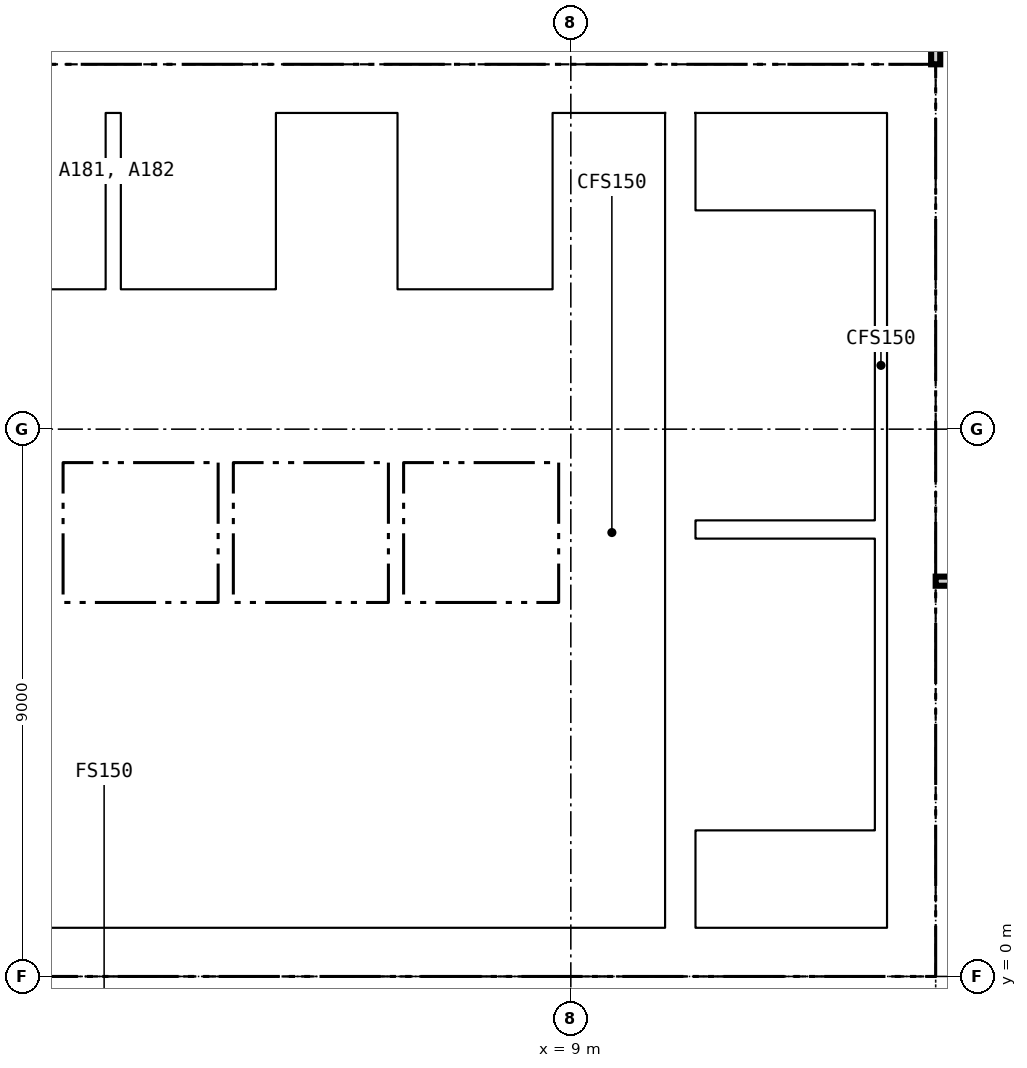
"""IFC4 building model, lengths in metres.
Left out: names, types, materials, properties, quantities, classifications, styles, units other than length and angle.
Written with IfcOpenShell. Run it as: python <this file> out.ifc"""

import sys

from ifc_helpers import new_model, si_unit, direction, frame, frame_2d, origin, place, context, subcontext, project, spatial, rectangle, extrude, element, fill, save


model = new_model("IFC4")
c1 = context("Model", 3, precision=1e-05, world=origin(), true_north=direction((0.0, 1.0)))
c2 = subcontext(c1, "Body", "Model", "MODEL_VIEW")
j1 = project(units=[si_unit("LENGTHUNIT", "METRE"), si_unit("PLANEANGLEUNIT", "RADIAN")], contexts=[c1])
p1 = place(None, origin())
s1 = spatial("IfcSite", under=j1, at=p1, CompositionType="ELEMENT")
p2 = place(p1, origin())
s2 = spatial("IfcBuilding", under=s1, at=p2, CompositionType="ELEMENT")
p3 = place(p2, frame((0.0, 0.0, 148.05)))
s3 = spatial("IfcBuildingStorey", under=s2, at=p3, CompositionType="ELEMENT", Elevation=148.05)
p4 = place(p3, frame((-15.0, 0.4, -0.15), z_axis=(0.0, 0.0, 1.0), x_axis=(1.0, 0.0, 0.0)))
e1 = element("IfcWall", 1, at=p4, inside=s3, PredefinedType="SOLIDWALL", context=c2, shape_type="SweptSolid", body=[
    extrude(rectangle(XDim=30.0, YDim=0.8, at=frame_2d((15.0, 0.0))), origin(), (0.0, 0.0, 1.0), 3.65),
])
p5 = place(p4, frame((5.8, 0.0, 0.15)))
e2 = element("IfcOpeningElement", 2, at=p5, cuts=e1, PredefinedType="OPENING", context=c2, shape_type="SweptSolid", body=[
    extrude(rectangle(XDim=2.4, YDim=2.4, at=frame_2d((1.2, 1.2))), frame((0.0, 0.41, 0.0), z_axis=(0.0, -1.0, 0.0), x_axis=(1.0, 0.0, 0.0)), (0.0, 0.0, 1.0), 0.82),
])
p6 = place(p4, frame((13.8, 0.0, 0.15)))
e3 = element("IfcOpeningElement", 3, at=p6, cuts=e1, PredefinedType="OPENING", context=c2, shape_type="SweptSolid", body=[
    extrude(rectangle(XDim=2.4, YDim=2.4, at=frame_2d((1.2, 1.2))), frame((0.0, 0.41, 0.0), z_axis=(0.0, -1.0, 0.0), x_axis=(1.0, 0.0, 0.0)), (0.0, 0.0, 1.0), 0.82),
])
p7 = place(p4, frame((21.8, 0.0, 0.15)))
e4 = element("IfcOpeningElement", 4, at=p7, cuts=e1, PredefinedType="OPENING", context=c2, shape_type="SweptSolid", body=[
    extrude(rectangle(XDim=2.4, YDim=2.4, at=frame_2d((1.2, 1.2))), frame((0.0, 0.41, 0.0), z_axis=(0.0, -1.0, 0.0), x_axis=(1.0, 0.0, 0.0)), (0.0, 0.0, 1.0), 0.82),
])
p8 = place(p4, frame((1.5, 0.0, 0.15)))
e5 = element("IfcOpeningElement", 5, at=p8, cuts=e1, PredefinedType="OPENING", context=c2, shape_type="SweptSolid", body=[
    extrude(rectangle(XDim=1.2, YDim=2.1, at=frame_2d((0.6, 1.05))), frame((0.0, 0.41, 0.0), z_axis=(0.0, -1.0, 0.0), x_axis=(1.0, 0.0, 0.0)), (0.0, 0.0, 1.0), 0.82),
])
p9 = place(p4, frame((27.3, 0.0, 0.15)))
e6 = element("IfcOpeningElement", 6, at=p9, cuts=e1, PredefinedType="OPENING", context=c2, shape_type="SweptSolid", body=[
    extrude(rectangle(XDim=1.2, YDim=2.1, at=frame_2d((0.6, 1.05))), frame((0.0, 0.41, 0.0), z_axis=(0.0, -1.0, 0.0), x_axis=(1.0, 0.0, 0.0)), (0.0, 0.0, 1.0), 0.82),
])
p10 = place(p3, frame((-15.0, 14.6, -0.15), z_axis=(0.0, 0.0, 1.0), x_axis=(1.0, 0.0, 0.0)))
e7 = element("IfcWall", 7, at=p10, inside=s3, PredefinedType="SOLIDWALL", context=c2, shape_type="SweptSolid", body=[
    extrude(rectangle(XDim=30.0, YDim=0.8, at=frame_2d((15.0, 0.0))), origin(), (0.0, 0.0, 1.0), 3.65),
])
p11 = place(p10, frame((9.25, 0.0, 0.15)))
e8 = element("IfcOpeningElement", 8, at=p11, cuts=e7, PredefinedType="OPENING", context=c2, shape_type="SweptSolid", body=[
    extrude(rectangle(XDim=1.5, YDim=2.1, at=frame_2d((0.75, 1.05))), frame((0.0, 0.41, 0.0), z_axis=(0.0, -1.0, 0.0), x_axis=(1.0, 0.0, 0.0)), (0.0, 0.0, 1.0), 0.82),
])
p12 = place(p10, frame((19.4, 0.0, 0.15)))
e9 = element("IfcOpeningElement", 9, at=p12, cuts=e7, PredefinedType="OPENING", context=c2, shape_type="SweptSolid", body=[
    extrude(rectangle(XDim=1.5, YDim=2.1, at=frame_2d((0.75, 1.05))), frame((0.0, 0.41, 0.0), z_axis=(0.0, -1.0, 0.0), x_axis=(1.0, 0.0, 0.0)), (0.0, 0.0, 1.0), 0.82),
])
p13 = place(p10, frame((1.5, 0.0, 0.15)))
e10 = element("IfcOpeningElement", 10, at=p13, cuts=e7, PredefinedType="OPENING", context=c2, shape_type="SweptSolid", body=[
    extrude(rectangle(XDim=1.2, YDim=2.1, at=frame_2d((0.6, 1.05))), frame((0.0, 0.41, 0.0), z_axis=(0.0, -1.0, 0.0), x_axis=(1.0, 0.0, 0.0)), (0.0, 0.0, 1.0), 0.82),
])
p14 = place(p10, frame((27.3, 0.0, 0.15)))
e11 = element("IfcOpeningElement", 11, at=p14, cuts=e7, PredefinedType="OPENING", context=c2, shape_type="SweptSolid", body=[
    extrude(rectangle(XDim=1.2, YDim=2.1, at=frame_2d((0.6, 1.05))), frame((0.0, 0.41, 0.0), z_axis=(0.0, -1.0, 0.0), x_axis=(1.0, 0.0, 0.0)), (0.0, 0.0, 1.0), 0.82),
])
p15 = place(p3, frame((14.6, 0.8, -0.15), z_axis=(0.0, 0.0, 1.0), x_axis=(0.0, 1.0, 0.0)))
e12 = element("IfcWall", 12, at=p15, inside=s3, PredefinedType="SOLIDWALL", context=c2, shape_type="SweptSolid", body=[
    extrude(rectangle(XDim=13.4, YDim=0.8, at=frame_2d((6.7, 0.0))), origin(), (0.0, 0.0, 1.0), 3.65),
])
p16 = place(p3, frame((10.8, 0.8, -0.15), z_axis=(0.0, 0.0, 1.0), x_axis=(0.0, 1.0, 0.0)))
e13 = element("IfcWall", 13, at=p16, inside=s3, PredefinedType="SOLIDWALL", context=c2, shape_type="SweptSolid", body=[
    extrude(rectangle(XDim=13.4, YDim=0.5, at=frame_2d((6.7, 0.0))), origin(), (0.0, 0.0, 1.0), 3.65),
])
p17 = place(p3, frame((-10.55, 3.5, 0.0), z_axis=(0.0, 0.0, 1.0), x_axis=(1.0, 0.0, 0.0)))
e14 = element("IfcWall", 14, at=p17, inside=s3, PredefinedType="PARTITIONING", context=c2, shape_type="SweptSolid", body=[
    extrude(rectangle(XDim=21.1, YDim=0.2, at=frame_2d((10.55, 0.0))), origin(), (0.0, 0.0, 1.0), 3.5),
])
p18 = place(p17, frame((2.312, 0.0, 0.0)))
e15 = element("IfcOpeningElement", 15, at=p18, cuts=e14, PredefinedType="OPENING", context=c2, shape_type="SweptSolid", body=[
    extrude(rectangle(XDim=1.0, YDim=2.1, at=frame_2d((0.5, 1.05))), frame((0.0, 0.11, 0.0), z_axis=(0.0, -1.0, 0.0), x_axis=(1.0, 0.0, 0.0)), (0.0, 0.0, 1.0), 0.22),
])
p19 = place(p17, frame((7.05, 0.0, 0.0)))
e16 = element("IfcOpeningElement", 16, at=p19, cuts=e14, PredefinedType="OPENING", context=c2, shape_type="SweptSolid", body=[
    extrude(rectangle(XDim=1.0, YDim=2.1, at=frame_2d((0.5, 1.05))), frame((0.0, 0.11, 0.0), z_axis=(0.0, -1.0, 0.0), x_axis=(1.0, 0.0, 0.0)), (0.0, 0.0, 1.0), 0.22),
])
p20 = place(p17, frame((10.175, 0.0, 0.0)))
e17 = element("IfcOpeningElement", 17, at=p20, cuts=e14, PredefinedType="OPENING", context=c2, shape_type="SweptSolid", body=[
    extrude(rectangle(XDim=1.0, YDim=2.1, at=frame_2d((0.5, 1.05))), frame((0.0, 0.11, 0.0), z_axis=(0.0, -1.0, 0.0), x_axis=(1.0, 0.0, 0.0)), (0.0, 0.0, 1.0), 0.22),
])
p21 = place(p17, frame((14.05, 0.0, 0.0)))
e18 = element("IfcOpeningElement", 18, at=p21, cuts=e14, PredefinedType="OPENING", context=c2, shape_type="SweptSolid", body=[
    extrude(rectangle(XDim=1.0, YDim=2.1, at=frame_2d((0.5, 1.05))), frame((0.0, 0.11, 0.0), z_axis=(0.0, -1.0, 0.0), x_axis=(1.0, 0.0, 0.0)), (0.0, 0.0, 1.0), 0.22),
])
p22 = place(p17, frame((17.837, 0.0, 0.0)))
e19 = element("IfcOpeningElement", 19, at=p22, cuts=e14, PredefinedType="OPENING", context=c2, shape_type="SweptSolid", body=[
    extrude(rectangle(XDim=0.9, YDim=2.1, at=frame_2d((0.45, 1.05))), frame((0.0, 0.11, 0.0), z_axis=(0.0, -1.0, 0.0), x_axis=(1.0, 0.0, 0.0)), (0.0, 0.0, 1.0), 0.22),
])
p23 = place(p17, frame((19.9, 0.0, 0.0)))
e20 = element("IfcOpeningElement", 20, at=p23, cuts=e14, PredefinedType="OPENING", context=c2, shape_type="SweptSolid", body=[
    extrude(rectangle(XDim=0.9, YDim=2.1, at=frame_2d((0.45, 1.05))), frame((0.0, 0.11, 0.0), z_axis=(0.0, -1.0, 0.0), x_axis=(1.0, 0.0, 0.0)), (0.0, 0.0, 1.0), 0.22),
])
p24 = place(p3, frame((-10.55, 6.025, 0.0), z_axis=(0.0, 0.0, 1.0), x_axis=(1.0, 0.0, 0.0)))
e21 = element("IfcWall", 21, at=p24, inside=s3, PredefinedType="PARTITIONING", context=c2, shape_type="SweptSolid", body=[
    extrude(rectangle(XDim=21.1, YDim=0.25, at=frame_2d((10.55, 0.0))), origin(), (0.0, 0.0, 1.0), 3.5),
])
p25 = place(p3, frame((-10.55, 8.55, 0.0), z_axis=(0.0, 0.0, 1.0), x_axis=(1.0, 0.0, 0.0)))
e22 = element("IfcWall", 22, at=p25, inside=s3, PredefinedType="PARTITIONING", context=c2, shape_type="SweptSolid", body=[
    extrude(rectangle(XDim=21.1, YDim=0.2, at=frame_2d((10.55, 0.0))), origin(), (0.0, 0.0, 1.0), 3.5),
])
p26 = place(p25, frame((0.675, 0.0, 0.0)))
e23 = element("IfcOpeningElement", 23, at=p26, cuts=e22, PredefinedType="OPENING", context=c2, shape_type="SweptSolid", body=[
    extrude(rectangle(XDim=1.2, YDim=2.1, at=frame_2d((0.6, 1.05))), frame((0.0, 0.11, 0.0), z_axis=(0.0, -1.0, 0.0), x_axis=(1.0, 0.0, 0.0)), (0.0, 0.0, 1.0), 0.22),
])
p27 = place(p25, frame((3.475, 0.0, 0.0)))
e24 = element("IfcOpeningElement", 24, at=p27, cuts=e22, PredefinedType="OPENING", context=c2, shape_type="SweptSolid", body=[
    extrude(rectangle(XDim=1.2, YDim=2.1, at=frame_2d((0.6, 1.05))), frame((0.0, 0.11, 0.0), z_axis=(0.0, -1.0, 0.0), x_axis=(1.0, 0.0, 0.0)), (0.0, 0.0, 1.0), 0.22),
])
p28 = place(p25, frame((6.275, 0.0, 0.0)))
e25 = element("IfcOpeningElement", 25, at=p28, cuts=e22, PredefinedType="OPENING", context=c2, shape_type="SweptSolid", body=[
    extrude(rectangle(XDim=1.2, YDim=2.1, at=frame_2d((0.6, 1.05))), frame((0.0, 0.11, 0.0), z_axis=(0.0, -1.0, 0.0), x_axis=(1.0, 0.0, 0.0)), (0.0, 0.0, 1.0), 0.22),
])
p29 = place(p25, frame((9.075, 0.0, 0.0)))
e26 = element("IfcOpeningElement", 26, at=p29, cuts=e22, PredefinedType="OPENING", context=c2, shape_type="SweptSolid", body=[
    extrude(rectangle(XDim=1.2, YDim=2.1, at=frame_2d((0.6, 1.05))), frame((0.0, 0.11, 0.0), z_axis=(0.0, -1.0, 0.0), x_axis=(1.0, 0.0, 0.0)), (0.0, 0.0, 1.0), 0.22),
])
p30 = place(p25, frame((11.875, 0.0, 0.0)))
e27 = element("IfcOpeningElement", 27, at=p30, cuts=e22, PredefinedType="OPENING", context=c2, shape_type="SweptSolid", body=[
    extrude(rectangle(XDim=1.2, YDim=2.1, at=frame_2d((0.6, 1.05))), frame((0.0, 0.11, 0.0), z_axis=(0.0, -1.0, 0.0), x_axis=(1.0, 0.0, 0.0)), (0.0, 0.0, 1.0), 0.22),
])
p31 = place(p25, frame((14.675, 0.0, 0.0)))
e28 = element("IfcOpeningElement", 28, at=p31, cuts=e22, PredefinedType="OPENING", context=c2, shape_type="SweptSolid", body=[
    extrude(rectangle(XDim=1.2, YDim=2.1, at=frame_2d((0.6, 1.05))), frame((0.0, 0.11, 0.0), z_axis=(0.0, -1.0, 0.0), x_axis=(1.0, 0.0, 0.0)), (0.0, 0.0, 1.0), 0.22),
])
p32 = place(p25, frame((17.475, 0.0, 0.0)))
e29 = element("IfcOpeningElement", 29, at=p32, cuts=e22, PredefinedType="OPENING", context=c2, shape_type="SweptSolid", body=[
    extrude(rectangle(XDim=1.2, YDim=2.1, at=frame_2d((0.6, 1.05))), frame((0.0, 0.11, 0.0), z_axis=(0.0, -1.0, 0.0), x_axis=(1.0, 0.0, 0.0)), (0.0, 0.0, 1.0), 0.22),
])
p33 = place(p25, frame((19.9, 0.0, 0.0)))
e30 = element("IfcOpeningElement", 30, at=p33, cuts=e22, PredefinedType="OPENING", context=c2, shape_type="SweptSolid", body=[
    extrude(rectangle(XDim=0.9, YDim=2.1, at=frame_2d((0.45, 1.05))), frame((0.0, 0.11, 0.0), z_axis=(0.0, -1.0, 0.0), x_axis=(1.0, 0.0, 0.0)), (0.0, 0.0, 1.0), 0.22),
])
p34 = place(p3, frame((-4.25, 11.2, 0.0), z_axis=(0.0, 0.0, 1.0), x_axis=(1.0, 0.0, 0.0)))
e31 = element("IfcWall", 31, at=p34, inside=s3, PredefinedType="PARTITIONING", context=c2, shape_type="SweptSolid", body=[
    extrude(rectangle(XDim=8.65, YDim=0.2, at=frame_2d((4.325, 0.0))), origin(), (0.0, 0.0, 1.0), 3.5),
])
p35 = place(p34, frame((0.825, 0.0, 0.0)))
e32 = element("IfcOpeningElement", 32, at=p35, cuts=e31, PredefinedType="OPENING", context=c2, shape_type="SweptSolid", body=[
    extrude(rectangle(XDim=1.4, YDim=2.1, at=frame_2d((0.7, 1.05))), frame((0.0, 0.11, 0.0), z_axis=(0.0, -1.0, 0.0), x_axis=(1.0, 0.0, 0.0)), (0.0, 0.0, 1.0), 0.22),
])
p36 = place(p34, frame((3.625, 0.0, 0.0)))
e33 = element("IfcOpeningElement", 33, at=p36, cuts=e31, PredefinedType="OPENING", context=c2, shape_type="SweptSolid", body=[
    extrude(rectangle(XDim=1.4, YDim=2.1, at=frame_2d((0.7, 1.05))), frame((0.0, 0.11, 0.0), z_axis=(0.0, -1.0, 0.0), x_axis=(1.0, 0.0, 0.0)), (0.0, 0.0, 1.0), 0.22),
])
p37 = place(p3, frame((5.9, 11.2, 0.0), z_axis=(0.0, 0.0, 1.0), x_axis=(1.0, 0.0, 0.0)))
e34 = element("IfcWall", 34, at=p37, inside=s3, PredefinedType="PARTITIONING", context=c2, shape_type="SweptSolid", body=[
    extrude(rectangle(XDim=4.65, YDim=0.2, at=frame_2d((2.325, 0.0))), origin(), (0.0, 0.0, 1.0), 3.5),
])
p38 = place(p37, frame((3.4, 0.0, 0.0)))
e35 = element("IfcOpeningElement", 35, at=p38, cuts=e34, PredefinedType="OPENING", context=c2, shape_type="SweptSolid", body=[
    extrude(rectangle(XDim=0.9, YDim=2.1, at=frame_2d((0.45, 1.05))), frame((0.0, 0.11, 0.0), z_axis=(0.0, -1.0, 0.0), x_axis=(1.0, 0.0, 0.0)), (0.0, 0.0, 1.0), 0.22),
])
for number, where, z_axis, x_axis in (
    (36, (1.4, 3.6, 0.0), (0.0, 0.0, 1.0), (0.0, 1.0, 0.0)),
    (37, (6.6, 3.6, 0.0), (0.0, 0.0, 1.0), (0.0, 1.0, 0.0)),
):
    element("IfcWall", number, at=place(p3, frame(where, z_axis=z_axis, x_axis=x_axis)), inside=s3, PredefinedType="PARTITIONING", context=c2, shape_type="SweptSolid", body=[
        extrude(rectangle(XDim=2.3, YDim=0.15, at=frame_2d((1.15, 0.0))), origin(), (0.0, 0.0, 1.0), 3.5),
    ])
p39 = place(p3, frame((8.925, 3.6, 0.0), z_axis=(0.0, 0.0, 1.0), x_axis=(0.0, 1.0, 0.0)))
e38 = element("IfcWall", 38, at=p39, inside=s3, PredefinedType="PARTITIONING", context=c2, shape_type="SweptSolid", body=[
    extrude(rectangle(XDim=2.3, YDim=0.25, at=frame_2d((1.15, 0.0))), origin(), (0.0, 0.0, 1.0), 3.5),
])
for number, where, z_axis, x_axis in (
    (39, (0.525, 6.15, 0.0), (0.0, 0.0, 1.0), (0.0, 1.0, 0.0)),
    (40, (3.325, 6.15, 0.0), (0.0, 0.0, 1.0), (0.0, 1.0, 0.0)),
    (41, (6.125, 6.15, 0.0), (0.0, 0.0, 1.0), (0.0, 1.0, 0.0)),
    (42, (8.925, 6.15, 0.0), (0.0, 0.0, 1.0), (0.0, 1.0, 0.0)),
):
    element("IfcWall", number, at=place(p3, frame(where, z_axis=z_axis, x_axis=x_axis)), inside=s3, PredefinedType="PARTITIONING", context=c2, shape_type="SweptSolid", body=[
        extrude(rectangle(XDim=2.3, YDim=0.25, at=frame_2d((1.15, 0.0))), origin(), (0.0, 0.0, 1.0), 3.5),
    ])
for number, where, z_axis, x_axis in (
    (43, (1.475, 11.3, 0.0), (0.0, 0.0, 1.0), (0.0, 1.0, 0.0)),
    (44, (4.275, 11.3, 0.0), (0.0, 0.0, 1.0), (0.0, 1.0, 0.0)),
    (45, (6.025, 11.3, 0.0), (0.0, 0.0, 1.0), (0.0, 1.0, 0.0)),
    (46, (8.825, 11.3, 0.0), (0.0, 0.0, 1.0), (0.0, 1.0, 0.0)),
):
    element("IfcWall", number, at=place(p3, frame(where, z_axis=z_axis, x_axis=x_axis)), inside=s3, PredefinedType="PARTITIONING", context=c2, shape_type="SweptSolid", body=[
        extrude(rectangle(XDim=2.9, YDim=0.25, at=frame_2d((1.45, 0.0))), origin(), (0.0, 0.0, 1.0), 3.5),
    ])
p40 = place(p3, frame((11.05, 7.35, 0.0), z_axis=(0.0, 0.0, 1.0), x_axis=(1.0, 0.0, 0.0)))
e47 = element("IfcWall", 47, at=p40, inside=s3, PredefinedType="SOLIDWALL", context=c2, shape_type="SweptSolid", body=[
    extrude(rectangle(XDim=2.95, YDim=0.3, at=frame_2d((1.475, 0.0))), origin(), (0.0, 0.0, 1.0), 3.5),
])
p41 = place(p3, frame((14.1, 0.8, 0.0), z_axis=(0.0, 0.0, 1.0), x_axis=(0.0, 1.0, 0.0)))
e48 = element("IfcWall", 48, at=p41, inside=s3, PredefinedType="SOLIDWALL", context=c2, shape_type="SweptSolid", body=[
    extrude(rectangle(XDim=13.4, YDim=0.2, at=frame_2d((6.7, 0.0))), origin(), (0.0, 0.0, 1.0), 3.5),
])
p42 = place(p3, frame((15.0, 18.4, 0.0), z_axis=(0.0, 0.0, 1.0), x_axis=(0.0, -1.0, 0.0)))
e49 = element("IfcWall", 49, at=p42, inside=s3, PredefinedType="PARTITIONING", context=c2, shape_type="SweptSolid", body=[
    extrude(rectangle(XDim=3.4, YDim=0.15, at=frame_2d((1.7, 0.0))), origin(), (0.0, 0.0, 1.0), 2.741),
])
p43 = place(p3, frame((15.0, 6.5, 0.0), z_axis=(0.0, 0.0, 1.0), x_axis=(1.0, 0.0, 0.0)))
e50 = element("IfcWall", 50, at=p43, inside=s3, PredefinedType="PARTITIONING", context=c2, shape_type="SweptSolid", body=[
    extrude(rectangle(XDim=2.223, YDim=0.15, at=frame_2d((1.111, 0.0))), origin(), (0.0, 0.0, 1.0), 2.741),
])
p44 = place(p20, origin())
e51 = element("IfcDoor", 51, at=p44, inside=s3, OperationType="SINGLE_SWING_LEFT", PredefinedType="DOOR", context=c2, shape_type="SweptSolid", body=[
    extrude(rectangle(XDim=1.0, YDim=2.1, at=frame_2d((0.5, 1.05))), frame((0.0, 0.025, 0.0), z_axis=(0.0, -1.0, 0.0), x_axis=(1.0, 0.0, 0.0)), (0.0, 0.0, 1.0), 0.05),
])
fill(e17, e51)
p45 = place(p21, origin())
e52 = element("IfcDoor", 52, at=p45, inside=s3, OperationType="SINGLE_SWING_RIGHT", PredefinedType="DOOR", context=c2, shape_type="SweptSolid", body=[
    extrude(rectangle(XDim=1.0, YDim=2.1, at=frame_2d((0.5, 1.05))), frame((0.0, 0.025, 0.0), z_axis=(0.0, -1.0, 0.0), x_axis=(1.0, 0.0, 0.0)), (0.0, 0.0, 1.0), 0.05),
])
fill(e18, e52)
p46 = place(p22, origin())
e53 = element("IfcDoor", 53, at=p46, inside=s3, OperationType="SINGLE_SWING_LEFT", PredefinedType="DOOR", context=c2, shape_type="SweptSolid", body=[
    extrude(rectangle(XDim=0.9, YDim=2.1, at=frame_2d((0.45, 1.05))), frame((0.0, 0.025, 0.0), z_axis=(0.0, -1.0, 0.0), x_axis=(1.0, 0.0, 0.0)), (0.0, 0.0, 1.0), 0.05),
])
fill(e19, e53)
p47 = place(p23, origin())
e54 = element("IfcDoor", 54, at=p47, inside=s3, OperationType="SINGLE_SWING_RIGHT", PredefinedType="DOOR", context=c2, shape_type="SweptSolid", body=[
    extrude(rectangle(XDim=0.9, YDim=2.1, at=frame_2d((0.45, 1.05))), frame((0.0, 0.025, 0.0), z_axis=(0.0, -1.0, 0.0), x_axis=(1.0, 0.0, 0.0)), (0.0, 0.0, 1.0), 0.05),
])
fill(e20, e54)
p48 = place(p30, origin())
e55 = element("IfcDoor", 55, at=p48, inside=s3, OperationType="DOUBLE_DOOR_SLIDING", PredefinedType="DOOR", context=c2, shape_type="SweptSolid", body=[
    extrude(rectangle(XDim=1.2, YDim=2.1, at=frame_2d((0.6, 1.05))), frame((0.0, 0.025, 0.0), z_axis=(0.0, -1.0, 0.0), x_axis=(1.0, 0.0, 0.0)), (0.0, 0.0, 1.0), 0.05),
])
fill(e27, e55)
p49 = place(p31, origin())
e56 = element("IfcDoor", 56, at=p49, inside=s3, OperationType="DOUBLE_DOOR_SLIDING", PredefinedType="DOOR", context=c2, shape_type="SweptSolid", body=[
    extrude(rectangle(XDim=1.2, YDim=2.1, at=frame_2d((0.6, 1.05))), frame((0.0, 0.025, 0.0), z_axis=(0.0, -1.0, 0.0), x_axis=(1.0, 0.0, 0.0)), (0.0, 0.0, 1.0), 0.05),
])
fill(e28, e56)
p50 = place(p32, origin())
e57 = element("IfcDoor", 57, at=p50, inside=s3, OperationType="DOUBLE_DOOR_SLIDING", PredefinedType="DOOR", context=c2, shape_type="SweptSolid", body=[
    extrude(rectangle(XDim=1.2, YDim=2.1, at=frame_2d((0.6, 1.05))), frame((0.0, 0.025, 0.0), z_axis=(0.0, -1.0, 0.0), x_axis=(1.0, 0.0, 0.0)), (0.0, 0.0, 1.0), 0.05),
])
fill(e29, e57)
p51 = place(p33, origin())
e58 = element("IfcDoor", 58, at=p51, inside=s3, OperationType="SINGLE_SWING_RIGHT", PredefinedType="DOOR", context=c2, shape_type="SweptSolid", body=[
    extrude(rectangle(XDim=0.9, YDim=2.1, at=frame_2d((0.45, 1.05))), frame((0.0, 0.025, 0.0), z_axis=(0.0, -1.0, 0.0), x_axis=(1.0, 0.0, 0.0)), (0.0, 0.0, 1.0), 0.05),
])
fill(e30, e58)
p52 = place(p36, origin())
e59 = element("IfcDoor", 59, at=p52, inside=s3, OperationType="DOUBLE_DOOR_SLIDING", PredefinedType="DOOR", context=c2, shape_type="SweptSolid", body=[
    extrude(rectangle(XDim=1.4, YDim=2.1, at=frame_2d((0.7, 1.05))), frame((0.0, 0.025, 0.0), z_axis=(0.0, -1.0, 0.0), x_axis=(1.0, 0.0, 0.0)), (0.0, 0.0, 1.0), 0.05),
])
fill(e33, e59)
p53 = place(p38, origin())
e60 = element("IfcDoor", 60, at=p53, inside=s3, OperationType="SINGLE_SWING_LEFT", PredefinedType="DOOR", context=c2, shape_type="SweptSolid", body=[
    extrude(rectangle(XDim=0.9, YDim=2.1, at=frame_2d((0.45, 1.05))), frame((0.0, 0.025, 0.0), z_axis=(0.0, -1.0, 0.0), x_axis=(1.0, 0.0, 0.0)), (0.0, 0.0, 1.0), 0.05),
])
fill(e35, e60)
p54 = place(p6, origin())
e61 = element("IfcDoor", 61, at=p54, inside=s3, OperationType="DOUBLE_DOOR_DOUBLE_SWING", PredefinedType="DOOR", context=c2, shape_type="SweptSolid", body=[
    extrude(rectangle(XDim=2.4, YDim=2.4, at=frame_2d((1.2, 1.2))), frame((0.0, 0.025, 0.0), z_axis=(0.0, -1.0, 0.0), x_axis=(1.0, 0.0, 0.0)), (0.0, 0.0, 1.0), 0.05),
])
fill(e3, e61)
p55 = place(p7, origin())
e62 = element("IfcDoor", 62, at=p55, inside=s3, OperationType="DOUBLE_DOOR_DOUBLE_SWING", PredefinedType="DOOR", context=c2, shape_type="SweptSolid", body=[
    extrude(rectangle(XDim=2.4, YDim=2.4, at=frame_2d((1.2, 1.2))), frame((0.0, 0.025, 0.0), z_axis=(0.0, -1.0, 0.0), x_axis=(1.0, 0.0, 0.0)), (0.0, 0.0, 1.0), 0.05),
])
fill(e4, e62)
p56 = place(p12, origin())
e63 = element("IfcDoor", 63, at=p56, inside=s3, OperationType="DOUBLE_DOOR_SINGLE_SWING", PredefinedType="DOOR", context=c2, shape_type="SweptSolid", body=[
    extrude(rectangle(XDim=1.5, YDim=2.1, at=frame_2d((0.75, 1.05))), frame((0.0, 0.025, 0.0), z_axis=(0.0, -1.0, 0.0), x_axis=(1.0, 0.0, 0.0)), (0.0, 0.0, 1.0), 0.05),
])
fill(e9, e63)
p57 = place(p14, origin())
e64 = element("IfcDoor", 64, at=p57, inside=s3, OperationType="SINGLE_SWING_LEFT", PredefinedType="DOOR", context=c2, shape_type="SweptSolid", body=[
    extrude(rectangle(XDim=1.2, YDim=2.1, at=frame_2d((0.6, 1.05))), frame((0.0, 0.025, 0.0), z_axis=(0.0, -1.0, 0.0), x_axis=(1.0, 0.0, 0.0)), (0.0, 0.0, 1.0), 0.05),
])
fill(e11, e64)
p58 = place(p9, origin())
e65 = element("IfcDoor", 65, at=p58, inside=s3, OperationType="SINGLE_SWING_RIGHT", PredefinedType="DOOR", context=c2, shape_type="SweptSolid", body=[
    extrude(rectangle(XDim=1.2, YDim=2.1, at=frame_2d((0.6, 1.05))), frame((0.0, 0.025, 0.0), z_axis=(0.0, -1.0, 0.0), x_axis=(1.0, 0.0, 0.0)), (0.0, 0.0, 1.0), 0.05),
])
fill(e6, e65)
save(model, sys.argv[1])
